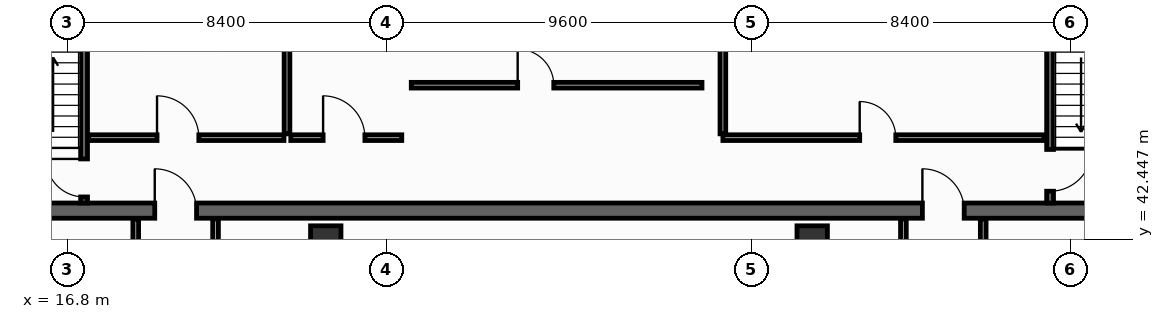
"""IFC4 building model, lengths in metres.
Left out: names, types, materials, properties, quantities, classifications, styles, units other than length and angle.
Written with IfcOpenShell. Run it as: python <this file> out.ifc"""

import sys

from ifc_helpers import new_model, si_unit, direction, frame, frame_2d, origin, origin_2d, place, context, subcontext, project, spatial, rectangle, hollow_rectangle, extrude, element, fill, save


model = new_model("IFC4")
c1 = context("Model", 3, precision=1e-05, world=origin(), true_north=direction((0.0, 1.0)))
c2 = subcontext(c1, "Body", "Model", "MODEL_VIEW")
j1 = project(units=[si_unit("LENGTHUNIT", "METRE"), si_unit("PLANEANGLEUNIT", "RADIAN")], contexts=[c1])
p1 = place(None, origin())
s1 = spatial("IfcSite", under=j1, at=p1, CompositionType="ELEMENT")
p2 = place(p1, origin())
s2 = spatial("IfcBuilding", under=s1, at=p2, CompositionType="ELEMENT")
p3 = place(p2, frame((0.0, 0.0, 245.8)))
s3 = spatial("IfcBuildingStorey", under=s2, at=p3, CompositionType="ELEMENT", Elevation=245.8)
p4 = place(p3, frame((13.7, 43.2, 0.0), z_axis=(0.0, 0.0, 1.0), x_axis=(1.0, 0.0, 0.0)))
e1 = element("IfcWall", 1, at=p4, inside=s3, PredefinedType="SHEAR", context=c2, shape_type="SweptSolid", body=[
    extrude(rectangle(XDim=32.5, YDim=0.4, at=frame_2d((16.25, 0.0))), origin(), (0.0, 0.0, 1.0), 3.55),
])
p5 = place(p4, frame((5.4, 0.0, 0.0)))
e2 = element("IfcOpeningElement", 2, at=p5, cuts=e1, PredefinedType="OPENING", context=c2, shape_type="SweptSolid", body=[
    extrude(rectangle(XDim=1.1, YDim=2.15, at=frame_2d((0.55, 1.075))), frame((0.0, 0.21, 0.0), z_axis=(0.0, -1.0, 0.0), x_axis=(1.0, 0.0, 0.0)), (0.0, 0.0, 1.0), 0.42),
])
p6 = place(p4, frame((25.6, 0.0, 0.0)))
e3 = element("IfcOpeningElement", 3, at=p6, cuts=e1, PredefinedType="OPENING", context=c2, shape_type="SweptSolid", body=[
    extrude(rectangle(XDim=1.1, YDim=2.15, at=frame_2d((0.55, 1.075))), frame((0.0, 0.21, 0.0), z_axis=(0.0, -1.0, 0.0), x_axis=(1.0, 0.0, 0.0)), (0.0, 0.0, 1.0), 0.42),
])
for number, where, z_axis, x_axis in (
    (4, (23.6, 42.4, 0.0), (0.0, 0.0, 1.0), (1.0, 0.0, 0.0)),
    (5, (36.4, 42.4, 0.0), (0.0, 0.0, 1.0), (1.0, 0.0, 0.0)),
):
    element("IfcColumn", number, at=place(p3, frame(where, z_axis=z_axis, x_axis=x_axis)), inside=s3, PredefinedType="COLUMN", context=c2, shape_type="SweptSolid", body=[
        extrude(hollow_rectangle(XDim=0.8, YDim=0.8, WallThickness=0.036, at=origin_2d()), origin(), (0.0, 0.0, 1.0), 3.8),
    ])
p7 = place(p3, frame((17.24, 43.4, 0.0), z_axis=(0.0, 0.0, 1.0), x_axis=(0.0, 1.0, 0.0)))
e6 = element("IfcWall", 6, at=p7, inside=s3, PredefinedType="SHEAR", context=c2, shape_type="SweptSolid", body=[
    extrude(rectangle(XDim=10.4, YDim=0.18, at=frame_2d((5.2, 0.0))), origin(), (0.0, 0.0, 1.0), 3.55),
])
p8 = place(p7, frame((0.16, 0.0, 0.0)))
e7 = element("IfcOpeningElement", 7, at=p8, cuts=e6, PredefinedType="OPENING", context=c2, shape_type="SweptSolid", body=[
    extrude(rectangle(XDim=1.0, YDim=2.15, at=frame_2d((0.5, 1.075))), frame((0.0, 0.1, 0.0), z_axis=(0.0, -1.0, 0.0), x_axis=(1.0, 0.0, 0.0)), (0.0, 0.0, 1.0), 0.2),
])
p9 = place(p3, frame((42.66, 53.8, 0.0), z_axis=(0.0, 0.0, 1.0), x_axis=(0.0, -1.0, 0.0)))
e8 = element("IfcWall", 8, at=p9, inside=s3, PredefinedType="SHEAR", context=c2, shape_type="SweptSolid", body=[
    extrude(rectangle(XDim=10.4, YDim=0.18, at=frame_2d((5.2, 0.0))), origin(), (0.0, 0.0, 1.0), 3.55),
])
p10 = place(p9, frame((8.99, 0.0, 0.0)))
e9 = element("IfcOpeningElement", 9, at=p10, cuts=e8, PredefinedType="OPENING", context=c2, shape_type="SweptSolid", body=[
    extrude(rectangle(XDim=1.1, YDim=2.15, at=frame_2d((0.55, 1.075))), frame((0.0, 0.1, 0.0), z_axis=(0.0, -1.0, 0.0), x_axis=(1.0, 0.0, 0.0)), (0.0, 0.0, 1.0), 0.2),
])
p11 = place(p3, frame((17.36, 45.12, 0.0), z_axis=(0.0, 0.0, 1.0), x_axis=(1.0, 0.0, 0.0)))
e10 = element("IfcWall", 10, at=p11, inside=s3, PredefinedType="PARTITIONING", context=c2, shape_type="SweptSolid", body=[
    extrude(rectangle(XDim=5.14, YDim=0.15, at=frame_2d((2.57, 0.0))), origin(), (0.0, 0.0, 1.0), 3.55),
])
p12 = place(p11, frame((1.8, 0.0, 0.0)))
e11 = element("IfcOpeningElement", 11, at=p12, cuts=e10, PredefinedType="OPENING", context=c2, shape_type="SweptSolid", body=[
    extrude(rectangle(XDim=1.1, YDim=2.15, at=frame_2d((0.55, 1.075))), frame((0.0, 0.085, 0.0), z_axis=(0.0, -1.0, 0.0), x_axis=(1.0, 0.0, 0.0)), (0.0, 0.0, 1.0), 0.17),
])
p13 = place(p3, frame((22.58, 50.55, 0.0), z_axis=(0.0, 0.0, 1.0), x_axis=(0.0, -1.0, 0.0)))
e12 = element("IfcWall", 12, at=p13, inside=s3, PredefinedType="PARTITIONING", context=c2, shape_type="SweptSolid", body=[
    extrude(rectangle(XDim=5.33, YDim=0.15, at=frame_2d((2.665, 0.0))), origin(), (0.0, 0.0, 1.0), 3.55),
])
p14 = place(p13, frame((1.8, 0.0, 0.0)))
e13 = element("IfcOpeningElement", 13, at=p14, cuts=e12, PredefinedType="OPENING", context=c2, shape_type="SweptSolid", body=[
    extrude(rectangle(XDim=1.1, YDim=2.15, at=frame_2d((0.55, 1.075))), frame((0.0, 0.085, 0.0), z_axis=(0.0, -1.0, 0.0), x_axis=(1.0, 0.0, 0.0)), (0.0, 0.0, 1.0), 0.17),
])
p15 = place(p3, frame((22.68, 45.12, 0.0), z_axis=(0.0, 0.0, 1.0), x_axis=(1.0, 0.0, 0.0)))
e14 = element("IfcWall", 14, at=p15, inside=s3, PredefinedType="PARTITIONING", context=c2, shape_type="SweptSolid", body=[
    extrude(rectangle(XDim=2.92, YDim=0.15, at=frame_2d((1.46, 0.0))), origin(), (0.0, 0.0, 1.0), 3.55),
])
p16 = place(p15, frame((0.85, 0.0, 0.0)))
e15 = element("IfcOpeningElement", 15, at=p16, cuts=e14, PredefinedType="OPENING", context=c2, shape_type="SweptSolid", body=[
    extrude(rectangle(XDim=1.1, YDim=2.15, at=frame_2d((0.55, 1.075))), frame((0.0, 0.085, 0.0), z_axis=(0.0, -1.0, 0.0), x_axis=(1.0, 0.0, 0.0)), (0.0, 0.0, 1.0), 0.17),
])
p17 = place(p3, frame((34.05, 45.12, 0.0), z_axis=(0.0, 0.0, 1.0), x_axis=(1.0, 0.0, 0.0)))
e16 = element("IfcWall", 16, at=p17, inside=s3, PredefinedType="PARTITIONING", context=c2, shape_type="SweptSolid", body=[
    extrude(rectangle(XDim=8.45, YDim=0.15, at=frame_2d((4.225, 0.0))), origin(), (0.0, 0.0, 1.0), 3.55),
])
p18 = place(p17, frame((3.6, 0.0, 0.0)))
e17 = element("IfcOpeningElement", 17, at=p18, cuts=e16, PredefinedType="OPENING", context=c2, shape_type="SweptSolid", body=[
    extrude(rectangle(XDim=0.95, YDim=2.15, at=frame_2d((0.475, 1.075))), frame((0.0, 0.085, 0.0), z_axis=(0.0, -1.0, 0.0), x_axis=(1.0, 0.0, 0.0)), (0.0, 0.0, 1.0), 0.17),
])
p19 = place(p3, frame((34.05, 45.22, 0.0), z_axis=(0.0, 0.0, 1.0), x_axis=(0.0, 1.0, 0.0)))
e18 = element("IfcWall", 18, at=p19, inside=s3, PredefinedType="PARTITIONING", context=c2, shape_type="SweptSolid", body=[
    extrude(rectangle(XDim=2.43, YDim=0.15, at=frame_2d((1.215, 0.0))), origin(), (0.0, 0.0, 1.0), 3.55),
])
p20 = place(p3, frame((25.85, 46.5, 0.0), z_axis=(0.0, 0.0, 1.0), x_axis=(1.0, 0.0, 0.0)))
e19 = element("IfcWall", 19, at=p20, inside=s3, PredefinedType="PARTITIONING", context=c2, shape_type="SweptSolid", body=[
    extrude(rectangle(XDim=7.65, YDim=0.15, at=frame_2d((3.825, 0.0))), origin(), (0.0, 0.0, 1.0), 3.55),
])
p21 = place(p20, frame((2.8, 0.0, 0.0)))
e20 = element("IfcOpeningElement", 20, at=p21, cuts=e19, PredefinedType="OPENING", context=c2, shape_type="SweptSolid", body=[
    extrude(rectangle(XDim=0.95, YDim=2.15, at=frame_2d((0.475, 1.075))), frame((0.0, 0.085, 0.0), z_axis=(0.0, -1.0, 0.0), x_axis=(1.0, 0.0, 0.0)), (0.0, 0.0, 1.0), 0.17),
])
for number, where, z_axis, x_axis in (
    (21, (18.6, 41.15, 0.0), (0.0, 0.0, 1.0), (0.0, 1.0, 0.0)),
    (22, (20.7, 41.15, 0.0), (0.0, 0.0, 1.0), (0.0, 1.0, 0.0)),
    (23, (38.8, 41.15, 0.0), (0.0, 0.0, 1.0), (0.0, 1.0, 0.0)),
    (24, (40.9, 41.15, 0.0), (0.0, 0.0, 1.0), (0.0, 1.0, 0.0)),
):
    element("IfcWall", number, at=place(p3, frame(where, z_axis=z_axis, x_axis=x_axis)), inside=s3, PredefinedType="PARTITIONING", context=c2, shape_type="SweptSolid", body=[
        extrude(rectangle(XDim=1.83, YDim=0.15, at=frame_2d((0.915, 0.0))), origin(), (0.0, 0.0, 1.0), 3.55),
    ])
p22 = place(p8, origin())
e25 = element("IfcDoor", 25, at=p22, inside=s3, OperationType="SINGLE_SWING_RIGHT", PredefinedType="DOOR", context=c2, shape_type="SweptSolid", body=[
    extrude(rectangle(XDim=1.0, YDim=2.15, at=frame_2d((0.5, 1.075))), frame((0.0, 0.025, 0.0), z_axis=(0.0, -1.0, 0.0), x_axis=(1.0, 0.0, 0.0)), (0.0, 0.0, 1.0), 0.05),
])
fill(e7, e25)
p23 = place(p10, origin())
e26 = element("IfcDoor", 26, at=p23, inside=s3, OperationType="SINGLE_SWING_LEFT", PredefinedType="DOOR", context=c2, shape_type="SweptSolid", body=[
    extrude(rectangle(XDim=1.1, YDim=2.15, at=frame_2d((0.55, 1.075))), frame((0.0, 0.025, 0.0), z_axis=(0.0, -1.0, 0.0), x_axis=(1.0, 0.0, 0.0)), (0.0, 0.0, 1.0), 0.05),
])
fill(e9, e26)
p24 = place(p12, origin())
e27 = element("IfcDoor", 27, at=p24, inside=s3, OperationType="SINGLE_SWING_LEFT", PredefinedType="DOOR", context=c2, shape_type="SweptSolid", body=[
    extrude(rectangle(XDim=1.1, YDim=2.15, at=frame_2d((0.55, 1.075))), frame((0.0, 0.025, 0.0), z_axis=(0.0, -1.0, 0.0), x_axis=(1.0, 0.0, 0.0)), (0.0, 0.0, 1.0), 0.05),
])
fill(e11, e27)
p25 = place(p16, origin())
e28 = element("IfcDoor", 28, at=p25, inside=s3, OperationType="SINGLE_SWING_LEFT", PredefinedType="DOOR", context=c2, shape_type="SweptSolid", body=[
    extrude(rectangle(XDim=1.1, YDim=2.15, at=frame_2d((0.55, 1.075))), frame((0.0, 0.025, 0.0), z_axis=(0.0, -1.0, 0.0), x_axis=(1.0, 0.0, 0.0)), (0.0, 0.0, 1.0), 0.05),
])
fill(e15, e28)
p26 = place(p5, origin())
e29 = element("IfcDoor", 29, at=p26, inside=s3, OperationType="SINGLE_SWING_LEFT", PredefinedType="DOOR", context=c2, shape_type="SweptSolid", body=[
    extrude(rectangle(XDim=1.1, YDim=2.15, at=frame_2d((0.55, 1.075))), frame((0.0, 0.025, 0.0), z_axis=(0.0, -1.0, 0.0), x_axis=(1.0, 0.0, 0.0)), (0.0, 0.0, 1.0), 0.05),
])
fill(e2, e29)
p27 = place(p6, origin())
e30 = element("IfcDoor", 30, at=p27, inside=s3, OperationType="SINGLE_SWING_LEFT", PredefinedType="DOOR", context=c2, shape_type="SweptSolid", body=[
    extrude(rectangle(XDim=1.1, YDim=2.15, at=frame_2d((0.55, 1.075))), frame((0.0, 0.025, 0.0), z_axis=(0.0, -1.0, 0.0), x_axis=(1.0, 0.0, 0.0)), (0.0, 0.0, 1.0), 0.05),
])
fill(e3, e30)
p28 = place(p18, origin())
e31 = element("IfcDoor", 31, at=p28, inside=s3, OperationType="SINGLE_SWING_LEFT", PredefinedType="DOOR", context=c2, shape_type="SweptSolid", body=[
    extrude(rectangle(XDim=0.95, YDim=2.15, at=frame_2d((0.475, 1.075))), frame((0.0, 0.025, 0.0), z_axis=(0.0, -1.0, 0.0), x_axis=(1.0, 0.0, 0.0)), (0.0, 0.0, 1.0), 0.05),
])
fill(e17, e31)
p29 = place(p21, origin())
e32 = element("IfcDoor", 32, at=p29, inside=s3, OperationType="SINGLE_SWING_LEFT", PredefinedType="DOOR", context=c2, shape_type="SweptSolid", body=[
    extrude(rectangle(XDim=0.95, YDim=2.15, at=frame_2d((0.475, 1.075))), frame((0.0, 0.025, 0.0), z_axis=(0.0, -1.0, 0.0), x_axis=(1.0, 0.0, 0.0)), (0.0, 0.0, 1.0), 0.05),
])
fill(e20, e32)
save(model, sys.argv[1])
